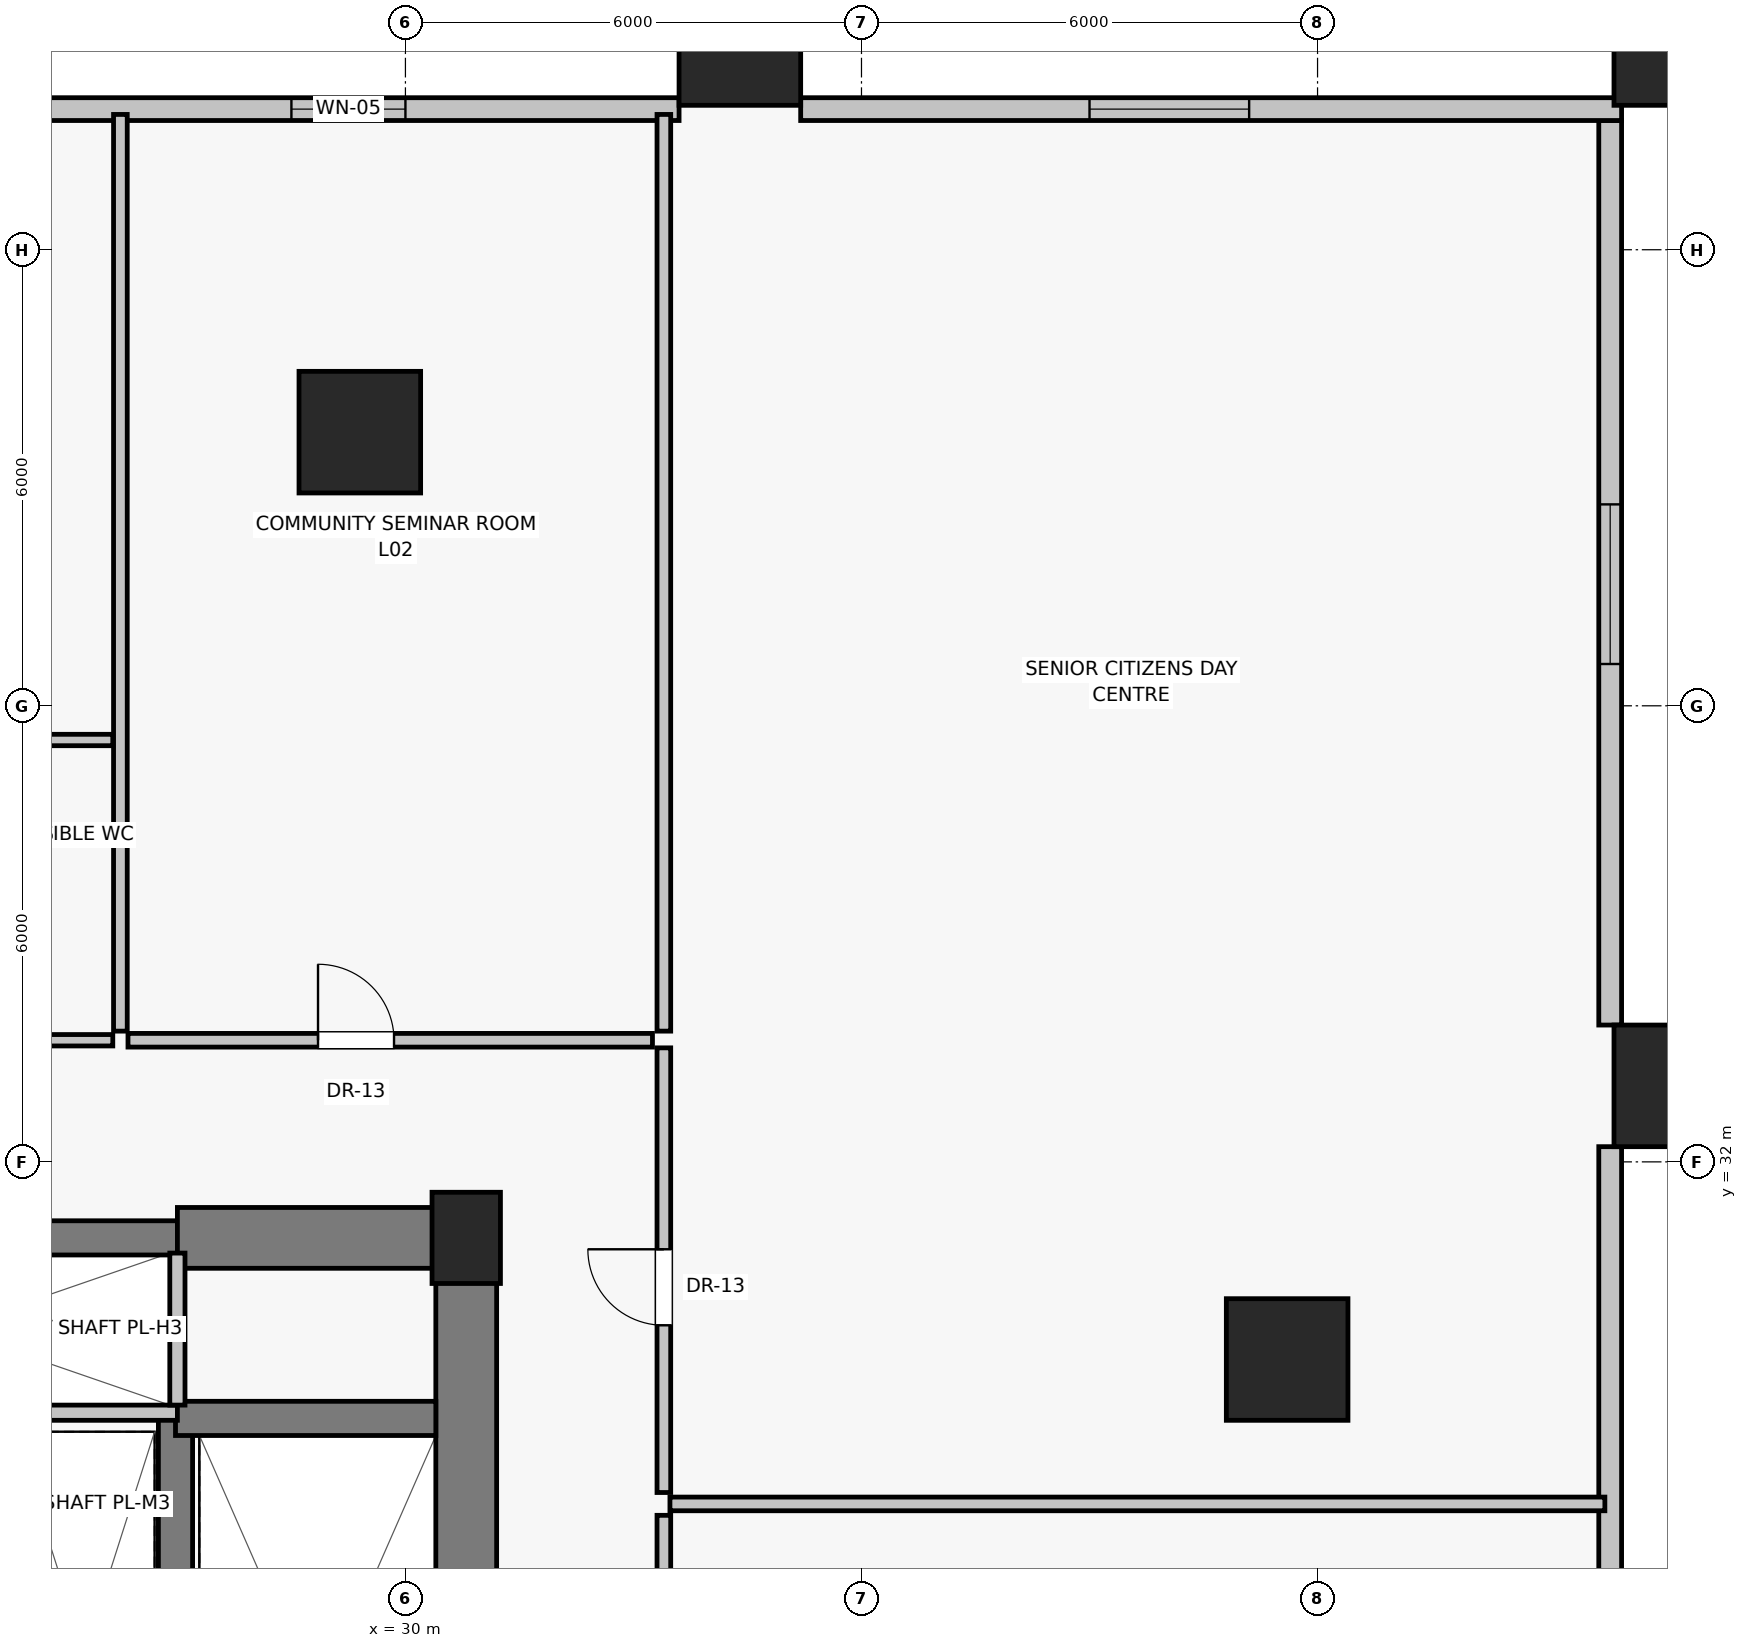
"""IFC4 building model, lengths in metres.
Left out: names, types, materials, properties, quantities, classifications, styles, units other than length and angle.
Written with IfcOpenShell. Run it as: python <this file> out.ifc"""

import sys

from ifc_helpers import new_model, si_unit, direction, frame, frame_2d, origin, origin_2d, place, context, subcontext, project, spatial, rectangle, extrude, source, transform, mapped, element, fill, save


model = new_model("IFC4")
c1 = context("Model", 3, precision=1e-05, world=origin(), true_north=direction((0.0, 1.0)))
c2 = subcontext(c1, "Body", "Model", "MODEL_VIEW")
j1 = project(units=[si_unit("LENGTHUNIT", "METRE"), si_unit("PLANEANGLEUNIT", "RADIAN")], contexts=[c1])
p1 = place(None, origin())
s1 = spatial("IfcSite", under=j1, at=p1, CompositionType="ELEMENT")
p2 = place(p1, origin())
s2 = spatial("IfcBuilding", under=s1, at=p2, CompositionType="ELEMENT")
p3 = place(p2, frame((0.0, 0.0, 9.6)))
s3 = spatial("IfcBuildingStorey", under=s2, at=p3, CompositionType="ELEMENT", Elevation=9.6)
p4 = place(p3, frame((30.8, 31.0, 0.0), z_axis=(0.0, 0.0, 1.0), x_axis=(1.0, 0.0, 0.0)))
e1 = element("IfcColumn", 1, at=p4, inside=s3, PredefinedType="PILASTER", context=c2, shape_type="SweptSolid", body=[
    extrude(rectangle(XDim=0.9, YDim=1.2, at=origin_2d()), origin(), (0.0, 0.0, 1.0), 4.4),
])
for number, where, z_axis, x_axis in (
    (2, (46.7, 33.0, 0.0), (0.0, 0.0, 1.0), (1.0, 0.0, 0.0)),
    (3, (34.4, 46.7, 0.0), (0.0, 0.0, 1.0), (1.0, 0.0, 0.0)),
    (4, (46.7, 46.7, 0.0), (0.0, 0.0, 1.0), (1.0, 0.0, 0.0)),
    (5, (41.6, 29.4, 0.0), (0.0, 0.0, 1.0), (1.0, 0.0, 0.0)),
    (6, (29.4, 41.6, 0.0), (0.0, 0.0, 1.0), (1.0, 0.0, 0.0)),
):
    element("IfcColumn", number, at=place(p3, frame(where, z_axis=z_axis, x_axis=x_axis)), inside=s3, PredefinedType="COLUMN", context=c2, shape_type="SweptSolid", body=[
        extrude(rectangle(XDim=1.6, YDim=1.6, at=origin_2d()), origin(), (0.0, 0.0, 1.0), 4.4),
    ])
p5 = place(p3, frame((45.85, 15.8, 0.0), z_axis=(0.0, 0.0, 1.0), x_axis=(0.0, 1.0, 0.0)))
e7 = element("IfcWall", 7, at=p5, inside=s3, PredefinedType="SOLIDWALL", context=c2, shape_type="SweptSolid", body=[
    extrude(rectangle(XDim=16.4, YDim=0.3, at=frame_2d((8.2, 0.0))), origin(), (0.0, 0.0, 1.0), 3.0),
])
p6 = place(p5, frame((7.15, 0.0, 0.85)))
e8 = element("IfcOpeningElement", 8, at=p6, cuts=e7, PredefinedType="OPENING", context=c2, shape_type="SweptSolid", body=[
    extrude(rectangle(XDim=2.1, YDim=1.75, at=frame_2d((1.05, 0.875))), frame((0.0, 0.16, 0.0), z_axis=(0.0, -1.0, 0.0), x_axis=(1.0, 0.0, 0.0)), (0.0, 0.0, 1.0), 0.32),
])
p7 = place(p3, frame((45.85, 33.8, 0.0), z_axis=(0.0, 0.0, 1.0), x_axis=(0.0, 1.0, 0.0)))
e9 = element("IfcWall", 9, at=p7, inside=s3, PredefinedType="SOLIDWALL", context=c2, shape_type="SweptSolid", body=[
    extrude(rectangle(XDim=11.9, YDim=0.3, at=frame_2d((5.95, 0.0))), origin(), (0.0, 0.0, 1.0), 3.0),
])
p8 = place(p7, frame((4.75, 0.0, 0.85)))
e10 = element("IfcOpeningElement", 10, at=p8, cuts=e9, PredefinedType="OPENING", context=c2, shape_type="SweptSolid", body=[
    extrude(rectangle(XDim=2.1, YDim=1.75, at=frame_2d((1.05, 0.875))), frame((0.0, 0.16, 0.0), z_axis=(0.0, -1.0, 0.0), x_axis=(1.0, 0.0, 0.0)), (0.0, 0.0, 1.0), 0.32),
])
p9 = place(p3, frame((46.0, 45.85, 0.0), z_axis=(0.0, 0.0, 1.0), x_axis=(-1.0, 0.0, 0.0)))
e11 = element("IfcWall", 11, at=p9, inside=s3, PredefinedType="SOLIDWALL", context=c2, shape_type="SweptSolid", body=[
    extrude(rectangle(XDim=10.8, YDim=0.3, at=frame_2d((5.4, 0.0))), origin(), (0.0, 0.0, 1.0), 3.0),
])
p10 = place(p9, frame((4.9, 0.0, 0.85)))
e12 = element("IfcOpeningElement", 12, at=p10, cuts=e11, PredefinedType="OPENING", context=c2, shape_type="SweptSolid", body=[
    extrude(rectangle(XDim=2.1, YDim=1.75, at=frame_2d((1.05, 0.875))), frame((0.0, 0.16, 0.0), z_axis=(0.0, -1.0, 0.0), x_axis=(1.0, 0.0, 0.0)), (0.0, 0.0, 1.0), 0.32),
])
p11 = place(p3, frame((33.6, 45.85, 0.0), z_axis=(0.0, 0.0, 1.0), x_axis=(-1.0, 0.0, 0.0)))
e13 = element("IfcWall", 13, at=p11, inside=s3, PredefinedType="SOLIDWALL", context=c2, shape_type="SweptSolid", body=[
    extrude(rectangle(XDim=8.8, YDim=0.3, at=frame_2d((4.4, 0.0))), origin(), (0.0, 0.0, 1.0), 3.0),
])
p12 = place(p11, frame((3.6, 0.0, 0.85)))
e14 = element("IfcOpeningElement", 14, at=p12, cuts=e13, PredefinedType="OPENING", context=c2, shape_type="SweptSolid", body=[
    extrude(rectangle(XDim=1.5, YDim=1.6, at=frame_2d((0.75, 0.8))), frame((0.0, 0.16, 0.0), z_axis=(0.0, -1.0, 0.0), x_axis=(1.0, 0.0, 0.0)), (0.0, 0.0, 1.0), 0.32),
])
p13 = place(p3, frame((30.8, 16.8, 0.0), z_axis=(0.0, 0.0, 1.0), x_axis=(0.0, 1.0, 0.0)))
e15 = element("IfcWall", 15, at=p13, inside=s3, PredefinedType="SHEAR", context=c2, shape_type="SweptSolid", body=[
    extrude(rectangle(XDim=14.2, YDim=0.8, at=frame_2d((7.1, 0.0))), origin(), (0.0, 0.0, 1.0), 4.1),
])
p14 = place(p3, frame((21.0, 31.0, 0.0), z_axis=(0.0, 0.0, 1.0), x_axis=(1.0, 0.0, 0.0)))
e16 = element("IfcWall", 16, at=p14, inside=s3, PredefinedType="SHEAR", context=c2, shape_type="SweptSolid", body=[
    extrude(rectangle(XDim=6.0, YDim=0.45, at=frame_2d((3.0, 0.0))), origin(), (0.0, 0.0, 1.0), 4.1),
])
p15 = place(p3, frame((27.0, 31.0, 0.0), z_axis=(0.0, 0.0, 1.0), x_axis=(1.0, 0.0, 0.0)))
e17 = element("IfcWall", 17, at=p15, inside=s3, PredefinedType="SHEAR", context=c2, shape_type="SweptSolid", body=[
    extrude(rectangle(XDim=3.8, YDim=0.8, at=frame_2d((1.9, 0.0))), origin(), (0.0, 0.0, 1.0), 4.1),
])
p16 = place(p3, frame((26.975, 19.8, 0.0), z_axis=(0.0, 0.0, 1.0), x_axis=(0.0, 1.0, 0.0)))
e18 = element("IfcWall", 18, at=p16, inside=s3, PredefinedType="SHEAR", context=c2, shape_type="SweptSolid", body=[
    extrude(rectangle(XDim=8.825, YDim=0.45, at=frame_2d((4.413, 0.0))), origin(), (0.0, 0.0, 1.0), 4.1),
])
p17 = place(p3, frame((26.975, 28.625, 0.0), z_axis=(0.0, 0.0, 1.0), x_axis=(1.0, 0.0, 0.0)))
e19 = element("IfcWall", 19, at=p17, inside=s3, PredefinedType="SHEAR", context=c2, shape_type="SweptSolid", body=[
    extrude(rectangle(XDim=3.425, YDim=0.45, at=frame_2d((1.712, 0.0))), origin(), (0.0, 0.0, 1.0), 4.1),
])
p18 = place(p3, frame((21.0, 28.7, 0.0), z_axis=(0.0, 0.0, 1.0), x_axis=(1.0, 0.0, 0.0)))
e20 = element("IfcWall", 20, at=p18, inside=s3, PredefinedType="SOLIDWALL", context=c2, shape_type="SweptSolid", body=[
    extrude(rectangle(XDim=6.0, YDim=0.2, at=frame_2d((3.0, 0.0))), origin(), (0.0, 0.0, 1.0), 4.1),
])
p19 = place(p3, frame((27.0, 28.8, 0.0), z_axis=(0.0, 0.0, 1.0), x_axis=(0.0, 1.0, 0.0)))
e21 = element("IfcWall", 21, at=p19, inside=s3, PredefinedType="SOLIDWALL", context=c2, shape_type="SweptSolid", body=[
    extrude(rectangle(XDim=2.0, YDim=0.2, at=frame_2d((1.0, 0.0))), origin(), (0.0, 0.0, 1.0), 4.1),
])
p20 = place(p3, frame((33.4, 14.3, 0.0), z_axis=(0.0, 0.0, 1.0), x_axis=(0.0, 1.0, 0.0)))
e22 = element("IfcWall", 22, at=p20, inside=s3, PredefinedType="PARTITIONING", context=c2, shape_type="SweptSolid", body=[
    extrude(rectangle(XDim=13.05, YDim=0.18, at=frame_2d((6.525, 0.0))), origin(), (0.0, 0.0, 1.0), 4.1),
])
p21 = place(p20, frame((2.2, 0.0, 0.0)))
e23 = element("IfcOpeningElement", 23, at=p21, cuts=e22, PredefinedType="OPENING", context=c2, shape_type="SweptSolid", body=[
    extrude(rectangle(XDim=1.0, YDim=2.01, at=frame_2d((0.5, 1.005))), frame((0.0, 0.1, 0.0), z_axis=(0.0, -1.0, 0.0), x_axis=(1.0, 0.0, 0.0)), (0.0, 0.0, 1.0), 0.2),
])
p22 = place(p3, frame((33.4, 27.65, 0.0), z_axis=(0.0, 0.0, 1.0), x_axis=(0.0, 1.0, 0.0)))
e24 = element("IfcWall", 24, at=p22, inside=s3, PredefinedType="PARTITIONING", context=c2, shape_type="SweptSolid", body=[
    extrude(rectangle(XDim=5.85, YDim=0.18, at=frame_2d((2.925, 0.0))), origin(), (0.0, 0.0, 1.0), 4.1),
])
p23 = place(p22, frame((2.2, 0.0, 0.0)))
e25 = element("IfcOpeningElement", 25, at=p23, cuts=e24, PredefinedType="OPENING", context=c2, shape_type="SweptSolid", body=[
    extrude(rectangle(XDim=1.0, YDim=2.01, at=frame_2d((0.5, 1.005))), frame((0.0, 0.1, 0.0), z_axis=(0.0, -1.0, 0.0), x_axis=(1.0, 0.0, 0.0)), (0.0, 0.0, 1.0), 0.2),
])
p24 = place(p3, frame((33.48, 27.5, 0.0), z_axis=(0.0, 0.0, 1.0), x_axis=(1.0, 0.0, 0.0)))
e26 = element("IfcWall", 26, at=p24, inside=s3, PredefinedType="PARTITIONING", context=c2, shape_type="SweptSolid", body=[
    extrude(rectangle(XDim=12.3, YDim=0.18, at=frame_2d((6.15, 0.0))), origin(), (0.0, 0.0, 1.0), 4.1),
])
p25 = place(p3, frame((21.95, 33.6, 0.0), z_axis=(0.0, 0.0, 1.0), x_axis=(1.0, 0.0, 0.0)))
e27 = element("IfcWall", 27, at=p25, inside=s3, PredefinedType="PARTITIONING", context=c2, shape_type="SweptSolid", body=[
    extrude(rectangle(XDim=4.2, YDim=0.15, at=frame_2d((2.1, 0.0))), origin(), (0.0, 0.0, 1.0), 4.1),
])
p26 = place(p25, frame((1.5, 0.0, 0.0)))
e28 = element("IfcOpeningElement", 28, at=p26, cuts=e27, PredefinedType="OPENING", context=c2, shape_type="SweptSolid", body=[
    extrude(rectangle(XDim=1.0, YDim=2.01, at=frame_2d((0.5, 1.005))), frame((0.0, 0.085, 0.0), z_axis=(0.0, -1.0, 0.0), x_axis=(1.0, 0.0, 0.0)), (0.0, 0.0, 1.0), 0.17),
])
p27 = place(p3, frame((26.35, 33.6, 0.0), z_axis=(0.0, 0.0, 1.0), x_axis=(1.0, 0.0, 0.0)))
e29 = element("IfcWall", 29, at=p27, inside=s3, PredefinedType="PARTITIONING", context=c2, shape_type="SweptSolid", body=[
    extrude(rectangle(XDim=6.9, YDim=0.18, at=frame_2d((3.45, 0.0))), origin(), (0.0, 0.0, 1.0), 4.1),
])
p28 = place(p27, frame((2.5, 0.0, 0.0)))
e30 = element("IfcOpeningElement", 30, at=p28, cuts=e29, PredefinedType="OPENING", context=c2, shape_type="SweptSolid", body=[
    extrude(rectangle(XDim=1.0, YDim=2.01, at=frame_2d((0.5, 1.005))), frame((0.0, 0.1, 0.0), z_axis=(0.0, -1.0, 0.0), x_axis=(1.0, 0.0, 0.0)), (0.0, 0.0, 1.0), 0.2),
])
for number, where, z_axis, x_axis in (
    (31, (26.25, 33.72, 0.0), (0.0, 0.0, 1.0), (0.0, 1.0, 0.0)),
    (32, (33.4, 33.72, 0.0), (0.0, 0.0, 1.0), (0.0, 1.0, 0.0)),
):
    element("IfcWall", number, at=place(p3, frame(where, z_axis=z_axis, x_axis=x_axis)), inside=s3, PredefinedType="PARTITIONING", context=c2, shape_type="SweptSolid", body=[
        extrude(rectangle(XDim=12.06, YDim=0.18, at=frame_2d((6.03, 0.0))), origin(), (0.0, 0.0, 1.0), 4.1),
    ])
p29 = place(p3, frame((17.0, 37.55, 0.0), z_axis=(0.0, 0.0, 1.0), x_axis=(1.0, 0.0, 0.0)))
e33 = element("IfcWall", 33, at=p29, inside=s3, PredefinedType="PARTITIONING", context=c2, shape_type="SweptSolid", body=[
    extrude(rectangle(XDim=9.15, YDim=0.15, at=frame_2d((4.575, 0.0))), origin(), (0.0, 0.0, 1.0), 4.1),
])
m1 = source(origin(), c2, "Body", "SweptSolid", [
    extrude(rectangle(XDim=2.1, YDim=1.75, at=frame_2d((1.05, 0.875))), frame((0.0, 0.03, 0.0), z_axis=(0.0, -1.0, 0.0), x_axis=(1.0, 0.0, 0.0)), (0.0, 0.0, 1.0), 0.06),
])
p30 = place(p8, origin())
e34 = element("IfcWindow", 34, at=p30, inside=s3, PartitioningType="DOUBLE_PANEL_VERTICAL", PredefinedType="WINDOW", context=c2, shape_type="MappedRepresentation", body=[
    mapped(m1, transform((0.0, 0.0, 0.0), scale=1.0)),
])
fill(e10, e34)
p31 = place(p10, origin())
e35 = element("IfcWindow", 35, at=p31, inside=s3, PartitioningType="DOUBLE_PANEL_VERTICAL", PredefinedType="WINDOW", context=c2, shape_type="MappedRepresentation", body=[
    mapped(m1, transform((0.0, 0.0, 0.0), scale=1.0)),
])
fill(e12, e35)
m2 = source(origin(), c2, "Body", "SweptSolid", [
    extrude(rectangle(XDim=1.5, YDim=1.6, at=frame_2d((0.75, 0.8))), frame((0.0, 0.03, 0.0), z_axis=(0.0, -1.0, 0.0), x_axis=(1.0, 0.0, 0.0)), (0.0, 0.0, 1.0), 0.06),
])
p32 = place(p12, origin())
e36 = element("IfcWindow", 36, at=p32, inside=s3, PartitioningType="DOUBLE_PANEL_VERTICAL", PredefinedType="WINDOW", context=c2, shape_type="MappedRepresentation", body=[
    mapped(m2, transform((0.0, 0.0, 0.0), scale=1.0)),
])
fill(e14, e36)
m3 = source(origin(), c2, "Body", "SweptSolid", [
    extrude(rectangle(XDim=1.0, YDim=2.01, at=frame_2d((0.5, 1.005))), frame((0.0, 0.025, 0.0), z_axis=(0.0, -1.0, 0.0), x_axis=(1.0, 0.0, 0.0)), (0.0, 0.0, 1.0), 0.05),
])
p33 = place(p23, origin())
e37 = element("IfcDoor", 37, at=p33, inside=s3, OperationType="SINGLE_SWING_RIGHT", PredefinedType="DOOR", context=c2, shape_type="MappedRepresentation", body=[
    mapped(m3, transform((0.0, 0.0, 0.0), scale=1.0)),
])
fill(e25, e37)
p34 = place(p28, origin())
e38 = element("IfcDoor", 38, at=p34, inside=s3, OperationType="SINGLE_SWING_LEFT", PredefinedType="DOOR", context=c2, shape_type="MappedRepresentation", body=[
    mapped(m3, transform((0.0, 0.0, 0.0), scale=1.0)),
])
fill(e30, e38)
save(model, sys.argv[1])
